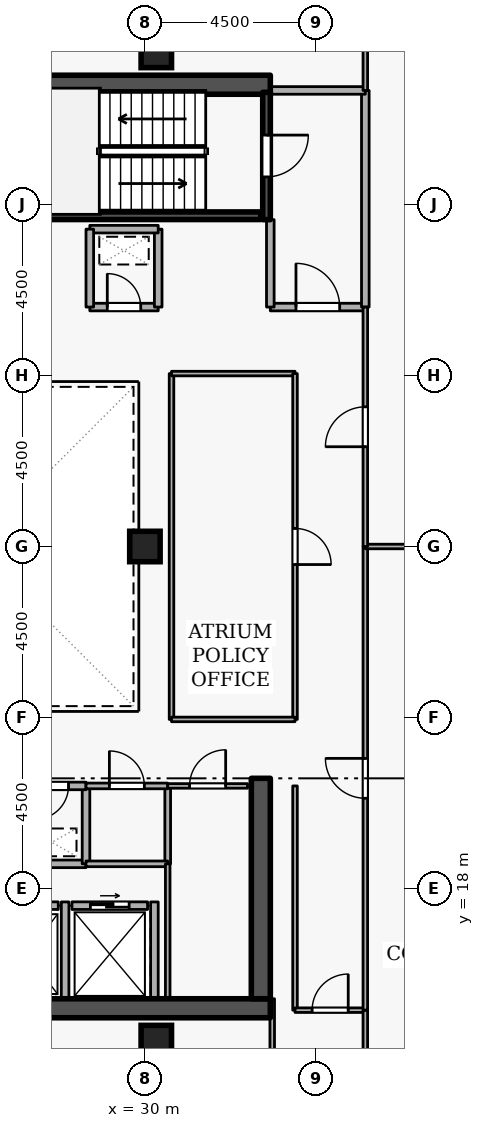
"""IFC4 building model, lengths in metres.
Left out: names, types, materials, properties, quantities, classifications, styles, units other than length and angle.
Written with IfcOpenShell. Run it as: python <this file> out.ifc"""

import sys

from ifc_helpers import new_model, si_unit, direction, frame, frame_2d, origin, origin_2d, place, context, subcontext, project, spatial, rectangle, extrude, element, fill, save


model = new_model("IFC4")
c1 = context("Model", 3, precision=1e-05, world=origin(), true_north=direction((0.0, 1.0)))
c2 = subcontext(c1, "Body", "Model", "MODEL_VIEW")
j1 = project(units=[si_unit("LENGTHUNIT", "METRE"), si_unit("PLANEANGLEUNIT", "RADIAN")], contexts=[c1])
p1 = place(None, origin())
s1 = spatial("IfcSite", under=j1, at=p1, CompositionType="ELEMENT")
p2 = place(p1, origin())
s2 = spatial("IfcBuilding", under=s1, at=p2, CompositionType="ELEMENT")
p3 = place(p2, frame((0.0, 0.0, 258.3)))
s3 = spatial("IfcBuildingStorey", under=s2, at=p3, CompositionType="ELEMENT", Elevation=258.3)
p4 = place(p3, frame((17.7, 14.85, 0.0), z_axis=(0.0, 0.0, 1.0), x_axis=(1.0, 0.0, 0.0)))
e1 = element("IfcWall", 1, at=p4, inside=s3, PredefinedType="SHEAR", context=c2, shape_type="SweptSolid", body=[
    extrude(rectangle(XDim=15.6, YDim=0.5, at=frame_2d((7.8, 0.0))), origin(), (0.0, 0.0, 1.0), 3.6),
])
p5 = place(p3, frame((33.05, 15.1, 0.0), z_axis=(0.0, 0.0, 1.0), x_axis=(0.0, 1.0, 0.0)))
e2 = element("IfcWall", 2, at=p5, inside=s3, PredefinedType="SHEAR", context=c2, shape_type="SweptSolid", body=[
    extrude(rectangle(XDim=5.8, YDim=0.5, at=frame_2d((2.9, 0.0))), origin(), (0.0, 0.0, 1.0), 3.6),
])
p6 = place(p3, frame((17.7, 39.15, 0.0), z_axis=(0.0, 0.0, 1.0), x_axis=(1.0, 0.0, 0.0)))
e3 = element("IfcWall", 3, at=p6, inside=s3, PredefinedType="SHEAR", context=c2, shape_type="SweptSolid", body=[
    extrude(rectangle(XDim=15.6, YDim=0.5, at=frame_2d((7.8, 0.0))), origin(), (0.0, 0.0, 1.0), 3.6),
])
for number, where, z_axis, x_axis in (
    (4, (30.3, 14.0, 0.0), (0.0, 0.0, 1.0), (1.0, 0.0, 0.0)),
    (5, (30.3, 40.0, 0.0), (0.0, 0.0, 1.0), (1.0, 0.0, 0.0)),
    (6, (30.0, 27.0, 0.0), (0.0, 0.0, 1.0), (1.0, 0.0, 0.0)),
):
    element("IfcColumn", number, at=place(p3, frame(where, z_axis=z_axis, x_axis=x_axis)), inside=s3, PredefinedType="COLUMN", context=c2, shape_type="SweptSolid", body=[
        extrude(rectangle(XDim=0.8, YDim=0.8, at=origin_2d()), origin(), (0.0, 0.0, 1.0), 3.6),
    ])
p7 = place(p3, frame((26.08, 17.55, 0.0), z_axis=(0.0, 0.0, 1.0), x_axis=(1.0, 0.0, 0.0)))
e7 = element("IfcWall", 7, at=p7, inside=s3, PredefinedType="STANDARD", context=c2, shape_type="SweptSolid", body=[
    extrude(rectangle(XDim=1.64, YDim=0.2, at=frame_2d((0.82, 0.0))), origin(), (0.0, 0.0, 1.0), 3.34),
])
p8 = place(p7, frame((0.31, 0.0, 0.0)))
e8 = element("IfcOpeningElement", 8, at=p8, cuts=e7, PredefinedType="OPENING", context=c2, shape_type="SweptSolid", body=[
    extrude(rectangle(XDim=1.02, YDim=2.06, at=frame_2d((0.51, 1.03))), frame((0.0, 0.11, 0.0), z_axis=(0.0, -1.0, 0.0), x_axis=(1.0, 0.0, 0.0)), (0.0, 0.0, 1.0), 0.22),
])
p9 = place(p3, frame((28.08, 17.55, 0.0), z_axis=(0.0, 0.0, 1.0), x_axis=(1.0, 0.0, 0.0)))
e9 = element("IfcWall", 9, at=p9, inside=s3, PredefinedType="STANDARD", context=c2, shape_type="SweptSolid", body=[
    extrude(rectangle(XDim=1.99, YDim=0.2, at=frame_2d((0.995, 0.0))), origin(), (0.0, 0.0, 1.0), 3.34),
])
p10 = place(p9, frame((0.485, 0.0, 0.0)))
e10 = element("IfcOpeningElement", 10, at=p10, cuts=e9, PredefinedType="OPENING", context=c2, shape_type="SweptSolid", body=[
    extrude(rectangle(XDim=1.02, YDim=2.06, at=frame_2d((0.51, 1.03))), frame((0.0, 0.11, 0.0), z_axis=(0.0, -1.0, 0.0), x_axis=(1.0, 0.0, 0.0)), (0.0, 0.0, 1.0), 0.22),
])
for number, where, z_axis, x_axis in (
    (11, (27.9, 15.112, 0.0), (0.0, 0.0, 1.0), (0.0, 1.0, 0.0)),
    (12, (30.25, 15.112, 0.0), (0.0, 0.0, 1.0), (0.0, 1.0, 0.0)),
):
    element("IfcWall", number, at=place(p3, frame(where, z_axis=z_axis, x_axis=x_axis)), inside=s3, PredefinedType="STANDARD", context=c2, shape_type="SweptSolid", body=[
        extrude(rectangle(XDim=2.536, YDim=0.2, at=frame_2d((1.268, 0.0))), origin(), (0.0, 0.0, 1.0), 3.34),
    ])
p11 = place(p3, frame((33.2, 38.95, 0.0), z_axis=(0.0, 0.0, 1.0), x_axis=(0.0, -1.0, 0.0)))
e13 = element("IfcWall", 13, at=p11, inside=s3, PredefinedType="SHEAR", context=c2, shape_type="SweptSolid", body=[
    extrude(rectangle(XDim=3.35, YDim=0.2, at=frame_2d((1.675, 0.0))), origin(), (0.0, 0.0, 1.0), 3.6),
])
p12 = place(p11, frame((1.125, 0.0, 0.0)))
e14 = element("IfcOpeningElement", 14, at=p12, cuts=e13, PredefinedType="OPENING", context=c2, shape_type="SweptSolid", body=[
    extrude(rectangle(XDim=1.1, YDim=2.1, at=frame_2d((0.55, 1.05))), frame((0.0, 0.11, 0.0), z_axis=(0.0, -1.0, 0.0), x_axis=(1.0, 0.0, 0.0)), (0.0, 0.0, 1.0), 0.22),
])
p13 = place(p3, frame((25.95, 35.703, 0.0), z_axis=(0.0, 0.0, 1.0), x_axis=(1.0, 0.0, 0.0)))
e15 = element("IfcWall", 15, at=p13, inside=s3, PredefinedType="SHEAR", context=c2, shape_type="SweptSolid", body=[
    extrude(rectangle(XDim=7.1, YDim=0.2, at=frame_2d((3.55, 0.0))), origin(), (0.0, 0.0, 1.0), 3.6),
])
p14 = place(p3, frame((33.3, 33.3, 0.0), z_axis=(0.0, 0.0, 1.0), x_axis=(1.0, 0.0, 0.0)))
e16 = element("IfcWall", 16, at=p14, inside=s3, PredefinedType="STANDARD", context=c2, shape_type="SweptSolid", body=[
    extrude(rectangle(XDim=2.5, YDim=0.2, at=frame_2d((1.25, 0.0))), origin(), (0.0, 0.0, 1.0), 3.34),
])
p15 = place(p14, frame((0.675, 0.0, 0.0)))
e17 = element("IfcOpeningElement", 17, at=p15, cuts=e16, PredefinedType="OPENING", context=c2, shape_type="SweptSolid", body=[
    extrude(rectangle(XDim=1.15, YDim=2.1, at=frame_2d((0.575, 1.05))), frame((0.0, 0.11, 0.0), z_axis=(0.0, -1.0, 0.0), x_axis=(1.0, 0.0, 0.0)), (0.0, 0.0, 1.0), 0.22),
])
p16 = place(p3, frame((35.8, 33.3, 0.0), z_axis=(0.0, 0.0, 1.0), x_axis=(0.0, 1.0, 0.0)))
e18 = element("IfcWall", 18, at=p16, inside=s3, PredefinedType="STANDARD", context=c2, shape_type="SweptSolid", body=[
    extrude(rectangle(XDim=5.7, YDim=0.2, at=frame_2d((2.85, 0.0))), origin(), (0.0, 0.0, 1.0), 3.34),
])
p17 = place(p3, frame((35.8, 39.0, 0.0), z_axis=(0.0, 0.0, 1.0), x_axis=(-1.0, 0.0, 0.0)))
e19 = element("IfcWall", 19, at=p17, inside=s3, PredefinedType="STANDARD", context=c2, shape_type="SweptSolid", body=[
    extrude(rectangle(XDim=2.5, YDim=0.2, at=frame_2d((1.25, 0.0))), origin(), (0.0, 0.0, 1.0), 3.34),
])
p18 = place(p3, frame((33.3, 35.6, 0.0), z_axis=(0.0, 0.0, 1.0), x_axis=(0.0, -1.0, 0.0)))
e20 = element("IfcWall", 20, at=p18, inside=s3, PredefinedType="STANDARD", context=c2, shape_type="SweptSolid", body=[
    extrude(rectangle(XDim=2.3, YDim=0.2, at=frame_2d((1.15, 0.0))), origin(), (0.0, 0.0, 1.0), 2.545),
])
p19 = place(p3, frame((26.65, 18.65, 0.0), z_axis=(0.0, 0.0, 1.0), x_axis=(1.0, 0.0, 0.0)))
e21 = element("IfcWall", 21, at=p19, inside=s3, PredefinedType="STANDARD", context=c2, shape_type="SweptSolid", body=[
    extrude(rectangle(XDim=1.8, YDim=0.2, at=frame_2d((0.9, 0.0))), origin(), (0.0, 0.0, 1.0), 3.34),
])
p20 = place(p3, frame((28.45, 18.65, 0.0), z_axis=(0.0, 0.0, 1.0), x_axis=(0.0, 1.0, 0.0)))
e22 = element("IfcWall", 22, at=p20, inside=s3, PredefinedType="STANDARD", context=c2, shape_type="SweptSolid", body=[
    extrude(rectangle(XDim=2.05, YDim=0.2, at=frame_2d((1.025, 0.0))), origin(), (0.0, 0.0, 1.0), 3.34),
])
p21 = place(p3, frame((28.45, 20.7, 0.0), z_axis=(0.0, 0.0, 1.0), x_axis=(-1.0, 0.0, 0.0)))
e23 = element("IfcWall", 23, at=p21, inside=s3, PredefinedType="STANDARD", context=c2, shape_type="SweptSolid", body=[
    extrude(rectangle(XDim=1.8, YDim=0.2, at=frame_2d((0.9, 0.0))), origin(), (0.0, 0.0, 1.0), 3.34),
])
p22 = place(p21, frame((0.46, 0.0, 0.0)))
e24 = element("IfcOpeningElement", 24, at=p22, cuts=e23, PredefinedType="OPENING", context=c2, shape_type="SweptSolid", body=[
    extrude(rectangle(XDim=0.88, YDim=2.04, at=frame_2d((0.44, 1.02))), frame((0.0, 0.11, 0.0), z_axis=(0.0, -1.0, 0.0), x_axis=(1.0, 0.0, 0.0)), (0.0, 0.0, 1.0), 0.22),
])
p23 = place(p3, frame((28.55, 33.3, 0.0), z_axis=(0.0, 0.0, 1.0), x_axis=(1.0, 0.0, 0.0)))
e25 = element("IfcWall", 25, at=p23, inside=s3, PredefinedType="STANDARD", context=c2, shape_type="SweptSolid", body=[
    extrude(rectangle(XDim=1.8, YDim=0.2, at=frame_2d((0.9, 0.0))), origin(), (0.0, 0.0, 1.0), 3.34),
])
p24 = place(p23, frame((0.46, 0.0, 0.0)))
e26 = element("IfcOpeningElement", 26, at=p24, cuts=e25, PredefinedType="OPENING", context=c2, shape_type="SweptSolid", body=[
    extrude(rectangle(XDim=0.88, YDim=2.04, at=frame_2d((0.44, 1.02))), frame((0.0, 0.11, 0.0), z_axis=(0.0, -1.0, 0.0), x_axis=(1.0, 0.0, 0.0)), (0.0, 0.0, 1.0), 0.22),
])
p25 = place(p3, frame((30.35, 33.3, 0.0), z_axis=(0.0, 0.0, 1.0), x_axis=(0.0, 1.0, 0.0)))
e27 = element("IfcWall", 27, at=p25, inside=s3, PredefinedType="STANDARD", context=c2, shape_type="SweptSolid", body=[
    extrude(rectangle(XDim=2.05, YDim=0.2, at=frame_2d((1.025, 0.0))), origin(), (0.0, 0.0, 1.0), 3.34),
])
p26 = place(p3, frame((30.35, 35.35, 0.0), z_axis=(0.0, 0.0, 1.0), x_axis=(-1.0, 0.0, 0.0)))
e28 = element("IfcWall", 28, at=p26, inside=s3, PredefinedType="STANDARD", context=c2, shape_type="SweptSolid", body=[
    extrude(rectangle(XDim=1.8, YDim=0.2, at=frame_2d((0.9, 0.0))), origin(), (0.0, 0.0, 1.0), 3.34),
])
p27 = place(p3, frame((28.55, 35.35, 0.0), z_axis=(0.0, 0.0, 1.0), x_axis=(0.0, -1.0, 0.0)))
e29 = element("IfcWall", 29, at=p27, inside=s3, PredefinedType="STANDARD", context=c2, shape_type="SweptSolid", body=[
    extrude(rectangle(XDim=2.05, YDim=0.2, at=frame_2d((1.025, 0.0))), origin(), (0.0, 0.0, 1.0), 3.34),
])
p28 = place(p3, frame((30.6, 20.7, 0.0), z_axis=(0.0, 0.0, 1.0), x_axis=(0.0, -1.0, 0.0)))
e30 = element("IfcWall", 30, at=p28, inside=s3, PredefinedType="PARTITIONING", context=c2, shape_type="SweptSolid", body=[
    extrude(rectangle(XDim=2.05, YDim=0.15, at=frame_2d((1.025, 0.0))), origin(), (0.0, 0.0, 1.0), 3.34),
])
p29 = place(p3, frame((30.6, 18.65, 0.0), z_axis=(0.0, 0.0, 1.0), x_axis=(-1.0, 0.0, 0.0)))
e31 = element("IfcWall", 31, at=p29, inside=s3, PredefinedType="PARTITIONING", context=c2, shape_type="SweptSolid", body=[
    extrude(rectangle(XDim=2.15, YDim=0.15, at=frame_2d((1.075, 0.0))), origin(), (0.0, 0.0, 1.0), 3.34),
])
p30 = place(p3, frame((28.45, 20.7, 0.0), z_axis=(0.0, 0.0, 1.0), x_axis=(1.0, 0.0, 0.0)))
e32 = element("IfcWall", 32, at=p30, inside=s3, PredefinedType="PARTITIONING", context=c2, shape_type="SweptSolid", body=[
    extrude(rectangle(XDim=2.15, YDim=0.15, at=frame_2d((1.075, 0.0))), origin(), (0.0, 0.0, 1.0), 3.34),
])
p31 = place(p30, frame((0.615, 0.0, 0.0)))
e33 = element("IfcOpeningElement", 33, at=p31, cuts=e32, PredefinedType="OPENING", context=c2, shape_type="SweptSolid", body=[
    extrude(rectangle(XDim=0.92, YDim=2.08, at=frame_2d((0.46, 1.04))), frame((0.0, 0.085, 0.0), z_axis=(0.0, -1.0, 0.0), x_axis=(1.0, 0.0, 0.0)), (0.0, 0.0, 1.0), 0.17),
])
p32 = place(p3, frame((30.6, 15.1, 0.0), z_axis=(0.0, 0.0, 1.0), x_axis=(0.0, 1.0, 0.0)))
e34 = element("IfcWall", 34, at=p32, inside=s3, PredefinedType="PARTITIONING", context=c2, shape_type="SweptSolid", body=[
    extrude(rectangle(XDim=3.55, YDim=0.12, at=frame_2d((1.775, 0.0))), origin(), (0.0, 0.0, 1.0), 3.34),
])
p33 = place(p3, frame((30.6, 20.7, 0.0), z_axis=(0.0, 0.0, 1.0), x_axis=(1.0, 0.0, 0.0)))
e35 = element("IfcWall", 35, at=p33, inside=s3, PredefinedType="PARTITIONING", context=c2, shape_type="SweptSolid", body=[
    extrude(rectangle(XDim=2.1, YDim=0.12, at=frame_2d((1.05, 0.0))), origin(), (0.0, 0.0, 1.0), 3.34),
])
p34 = place(p33, frame((0.575, 0.0, 0.0)))
e36 = element("IfcOpeningElement", 36, at=p34, cuts=e35, PredefinedType="OPENING", context=c2, shape_type="SweptSolid", body=[
    extrude(rectangle(XDim=0.95, YDim=2.1, at=frame_2d((0.475, 1.05))), frame((0.0, 0.07, 0.0), z_axis=(0.0, -1.0, 0.0), x_axis=(1.0, 0.0, 0.0)), (0.0, 0.0, 1.0), 0.14),
])
p35 = place(p3, frame((33.95, 20.7, 0.0), z_axis=(0.0, 0.0, 1.0), x_axis=(0.0, -1.0, 0.0)))
e37 = element("IfcWall", 37, at=p35, inside=s3, PredefinedType="PARTITIONING", context=c2, shape_type="SweptSolid", body=[
    extrude(rectangle(XDim=5.9, YDim=0.12, at=frame_2d((2.95, 0.0))), origin(), (0.0, 0.0, 1.0), 3.34),
])
p36 = place(p3, frame((33.95, 14.8, 0.0), z_axis=(0.0, 0.0, 1.0), x_axis=(1.0, 0.0, 0.0)))
e38 = element("IfcWall", 38, at=p36, inside=s3, PredefinedType="PARTITIONING", context=c2, shape_type="SweptSolid", body=[
    extrude(rectangle(XDim=1.85, YDim=0.12, at=frame_2d((0.925, 0.0))), origin(), (0.0, 0.0, 1.0), 3.34),
])
p37 = place(p36, frame((0.45, 0.0, 0.0)))
e39 = element("IfcOpeningElement", 39, at=p37, cuts=e38, PredefinedType="OPENING", context=c2, shape_type="SweptSolid", body=[
    extrude(rectangle(XDim=0.95, YDim=2.1, at=frame_2d((0.475, 1.05))), frame((0.0, 0.07, 0.0), z_axis=(0.0, -1.0, 0.0), x_axis=(1.0, 0.0, 0.0)), (0.0, 0.0, 1.0), 0.14),
])
p38 = place(p3, frame((35.8, 14.8, 0.0), z_axis=(0.0, 0.0, 1.0), x_axis=(0.0, -1.0, 0.0)))
e40 = element("IfcWall", 40, at=p38, inside=s3, PredefinedType="PARTITIONING", context=c2, shape_type="SweptSolid", body=[
    extrude(rectangle(XDim=11.52, YDim=0.12, at=frame_2d((5.76, 0.0))), origin(), (0.0, 0.0, 1.0), 3.34),
])
p39 = place(p3, frame((33.35, 3.28, 0.0), z_axis=(0.0, 0.0, 1.0), x_axis=(0.0, 1.0, 0.0)))
e41 = element("IfcWall", 41, at=p39, inside=s3, PredefinedType="PARTITIONING", context=c2, shape_type="SweptSolid", body=[
    extrude(rectangle(XDim=11.82, YDim=0.12, at=frame_2d((5.91, 0.0))), origin(), (0.0, 0.0, 1.0), 2.545),
])
p40 = place(p3, frame((35.8, 14.8, 0.0), z_axis=(0.0, 0.0, 1.0), x_axis=(0.0, 1.0, 0.0)))
e42 = element("IfcWall", 42, at=p40, inside=s3, PredefinedType="PARTITIONING", context=c2, shape_type="SweptSolid", body=[
    extrude(rectangle(XDim=12.2, YDim=0.12, at=frame_2d((6.1, 0.0))), origin(), (0.0, 0.0, 1.0), 3.34),
])
p41 = place(p40, frame((5.575, 0.0, 0.0)))
e43 = element("IfcOpeningElement", 43, at=p41, cuts=e42, PredefinedType="OPENING", context=c2, shape_type="SweptSolid", body=[
    extrude(rectangle(XDim=1.05, YDim=2.1, at=frame_2d((0.525, 1.05))), frame((0.0, 0.07, 0.0), z_axis=(0.0, -1.0, 0.0), x_axis=(1.0, 0.0, 0.0)), (0.0, 0.0, 1.0), 0.14),
])
p42 = place(p3, frame((35.8, 27.0, 0.0), z_axis=(0.0, 0.0, 1.0), x_axis=(1.0, 0.0, 0.0)))
e44 = element("IfcWall", 44, at=p42, inside=s3, PredefinedType="PARTITIONING", context=c2, shape_type="SweptSolid", body=[
    extrude(rectangle(XDim=13.42, YDim=0.12, at=frame_2d((6.71, 0.0))), origin(), (0.0, 0.0, 1.0), 2.932),
])
p43 = place(p3, frame((35.8, 39.0, 0.0), z_axis=(0.0, 0.0, 1.0), x_axis=(0.0, 1.0, 0.0)))
e45 = element("IfcWall", 45, at=p43, inside=s3, PredefinedType="PARTITIONING", context=c2, shape_type="SweptSolid", body=[
    extrude(rectangle(XDim=5.72, YDim=0.12, at=frame_2d((2.86, 0.0))), origin(), (0.0, 0.0, 1.0), 3.34),
])
p44 = place(p3, frame((35.8, 27.0, 0.0), z_axis=(0.0, 0.0, 1.0), x_axis=(0.0, 1.0, 0.0)))
e46 = element("IfcWall", 46, at=p44, inside=s3, PredefinedType="PARTITIONING", context=c2, shape_type="SweptSolid", body=[
    extrude(rectangle(XDim=6.3, YDim=0.12, at=frame_2d((3.15, 0.0))), origin(), (0.0, 0.0, 1.0), 3.34),
])
p45 = place(p44, frame((2.625, 0.0, 0.0)))
e47 = element("IfcOpeningElement", 47, at=p45, cuts=e46, PredefinedType="OPENING", context=c2, shape_type="SweptSolid", body=[
    extrude(rectangle(XDim=1.05, YDim=2.1, at=frame_2d((0.525, 1.05))), frame((0.0, 0.07, 0.0), z_axis=(0.0, -1.0, 0.0), x_axis=(1.0, 0.0, 0.0)), (0.0, 0.0, 1.0), 0.14),
])
p46 = place(p3, frame((30.7, 22.45, 0.0), z_axis=(0.0, 0.0, 1.0), x_axis=(0.0, 1.0, 0.0)))
e48 = element("IfcWall", 48, at=p46, inside=s3, PredefinedType="PARTITIONING", context=c2, shape_type="SweptSolid", body=[
    extrude(rectangle(XDim=9.1, YDim=0.12, at=frame_2d((4.55, 0.0))), origin(), (0.0, 0.0, 1.0), 3.34),
])
p47 = place(p3, frame((30.7, 31.55, 0.0), z_axis=(0.0, 0.0, 1.0), x_axis=(1.0, 0.0, 0.0)))
e49 = element("IfcWall", 49, at=p47, inside=s3, PredefinedType="PARTITIONING", context=c2, shape_type="SweptSolid", body=[
    extrude(rectangle(XDim=3.25, YDim=0.12, at=frame_2d((1.625, 0.0))), origin(), (0.0, 0.0, 1.0), 3.34),
])
p48 = place(p3, frame((33.95, 31.55, 0.0), z_axis=(0.0, 0.0, 1.0), x_axis=(0.0, -1.0, 0.0)))
e50 = element("IfcWall", 50, at=p48, inside=s3, PredefinedType="PARTITIONING", context=c2, shape_type="SweptSolid", body=[
    extrude(rectangle(XDim=9.1, YDim=0.12, at=frame_2d((4.55, 0.0))), origin(), (0.0, 0.0, 1.0), 3.34),
])
p49 = place(p48, frame((4.075, 0.0, 0.0)))
e51 = element("IfcOpeningElement", 51, at=p49, cuts=e50, PredefinedType="OPENING", context=c2, shape_type="SweptSolid", body=[
    extrude(rectangle(XDim=0.95, YDim=2.1, at=frame_2d((0.475, 1.05))), frame((0.0, 0.07, 0.0), z_axis=(0.0, -1.0, 0.0), x_axis=(1.0, 0.0, 0.0)), (0.0, 0.0, 1.0), 0.14),
])
p50 = place(p3, frame((33.95, 22.45, 0.0), z_axis=(0.0, 0.0, 1.0), x_axis=(-1.0, 0.0, 0.0)))
e52 = element("IfcWall", 52, at=p50, inside=s3, PredefinedType="PARTITIONING", context=c2, shape_type="SweptSolid", body=[
    extrude(rectangle(XDim=3.25, YDim=0.12, at=frame_2d((1.625, 0.0))), origin(), (0.0, 0.0, 1.0), 3.34),
])
p51 = place(p10, origin())
e53 = element("IfcDoor", 53, at=p51, inside=s3, OperationType="SLIDING_TO_LEFT", PredefinedType="DOOR", context=c2, shape_type="SweptSolid", body=[
    extrude(rectangle(XDim=1.02, YDim=2.06, at=frame_2d((0.51, 1.03))), frame((0.0, 0.025, 0.0), z_axis=(0.0, -1.0, 0.0), x_axis=(1.0, 0.0, 0.0)), (0.0, 0.0, 1.0), 0.05),
])
fill(e10, e53)
p52 = place(p12, origin())
e54 = element("IfcDoor", 54, at=p52, inside=s3, OperationType="SINGLE_SWING_LEFT", PredefinedType="DOOR", context=c2, shape_type="SweptSolid", body=[
    extrude(rectangle(XDim=1.1, YDim=2.1, at=frame_2d((0.55, 1.05))), frame((0.0, 0.025, 0.0), z_axis=(0.0, -1.0, 0.0), x_axis=(1.0, 0.0, 0.0)), (0.0, 0.0, 1.0), 0.05),
])
fill(e14, e54)
p53 = place(p15, origin())
e55 = element("IfcDoor", 55, at=p53, inside=s3, OperationType="SINGLE_SWING_LEFT", PredefinedType="DOOR", context=c2, shape_type="SweptSolid", body=[
    extrude(rectangle(XDim=1.15, YDim=2.1, at=frame_2d((0.575, 1.05))), frame((0.0, 0.025, 0.0), z_axis=(0.0, -1.0, 0.0), x_axis=(1.0, 0.0, 0.0)), (0.0, 0.0, 1.0), 0.05),
])
fill(e17, e55)
p54 = place(p22, origin())
e56 = element("IfcDoor", 56, at=p54, inside=s3, OperationType="SINGLE_SWING_RIGHT", PredefinedType="DOOR", context=c2, shape_type="SweptSolid", body=[
    extrude(rectangle(XDim=0.88, YDim=2.04, at=frame_2d((0.44, 1.02))), frame((0.0, 0.025, 0.0), z_axis=(0.0, -1.0, 0.0), x_axis=(1.0, 0.0, 0.0)), (0.0, 0.0, 1.0), 0.05),
])
fill(e24, e56)
p55 = place(p24, origin())
e57 = element("IfcDoor", 57, at=p55, inside=s3, OperationType="SINGLE_SWING_LEFT", PredefinedType="DOOR", context=c2, shape_type="SweptSolid", body=[
    extrude(rectangle(XDim=0.88, YDim=2.04, at=frame_2d((0.44, 1.02))), frame((0.0, 0.025, 0.0), z_axis=(0.0, -1.0, 0.0), x_axis=(1.0, 0.0, 0.0)), (0.0, 0.0, 1.0), 0.05),
])
fill(e26, e57)
p56 = place(p31, origin())
e58 = element("IfcDoor", 58, at=p56, inside=s3, OperationType="SINGLE_SWING_LEFT", PredefinedType="DOOR", context=c2, shape_type="SweptSolid", body=[
    extrude(rectangle(XDim=0.92, YDim=2.08, at=frame_2d((0.46, 1.04))), frame((0.0, 0.025, 0.0), z_axis=(0.0, -1.0, 0.0), x_axis=(1.0, 0.0, 0.0)), (0.0, 0.0, 1.0), 0.05),
])
fill(e33, e58)
p57 = place(p34, origin())
e59 = element("IfcDoor", 59, at=p57, inside=s3, OperationType="SINGLE_SWING_RIGHT", PredefinedType="DOOR", context=c2, shape_type="SweptSolid", body=[
    extrude(rectangle(XDim=0.95, YDim=2.1, at=frame_2d((0.475, 1.05))), frame((0.0, 0.025, 0.0), z_axis=(0.0, -1.0, 0.0), x_axis=(1.0, 0.0, 0.0)), (0.0, 0.0, 1.0), 0.05),
])
fill(e36, e59)
p58 = place(p37, origin())
e60 = element("IfcDoor", 60, at=p58, inside=s3, OperationType="SINGLE_SWING_RIGHT", PredefinedType="DOOR", context=c2, shape_type="SweptSolid", body=[
    extrude(rectangle(XDim=0.95, YDim=2.1, at=frame_2d((0.475, 1.05))), frame((0.0, 0.025, 0.0), z_axis=(0.0, -1.0, 0.0), x_axis=(1.0, 0.0, 0.0)), (0.0, 0.0, 1.0), 0.05),
])
fill(e39, e60)
p59 = place(p41, origin())
e61 = element("IfcDoor", 61, at=p59, inside=s3, OperationType="SINGLE_SWING_RIGHT", PredefinedType="DOOR", context=c2, shape_type="SweptSolid", body=[
    extrude(rectangle(XDim=1.05, YDim=2.1, at=frame_2d((0.525, 1.05))), frame((0.0, 0.025, 0.0), z_axis=(0.0, -1.0, 0.0), x_axis=(1.0, 0.0, 0.0)), (0.0, 0.0, 1.0), 0.05),
])
fill(e43, e61)
p60 = place(p45, origin())
e62 = element("IfcDoor", 62, at=p60, inside=s3, OperationType="SINGLE_SWING_LEFT", PredefinedType="DOOR", context=c2, shape_type="SweptSolid", body=[
    extrude(rectangle(XDim=1.05, YDim=2.1, at=frame_2d((0.525, 1.05))), frame((0.0, 0.025, 0.0), z_axis=(0.0, -1.0, 0.0), x_axis=(1.0, 0.0, 0.0)), (0.0, 0.0, 1.0), 0.05),
])
fill(e47, e62)
p61 = place(p49, origin())
e63 = element("IfcDoor", 63, at=p61, inside=s3, OperationType="SINGLE_SWING_RIGHT", PredefinedType="DOOR", context=c2, shape_type="SweptSolid", body=[
    extrude(rectangle(XDim=0.95, YDim=2.1, at=frame_2d((0.475, 1.05))), frame((0.0, 0.025, 0.0), z_axis=(0.0, -1.0, 0.0), x_axis=(1.0, 0.0, 0.0)), (0.0, 0.0, 1.0), 0.05),
])
fill(e51, e63)
save(model, sys.argv[1])
